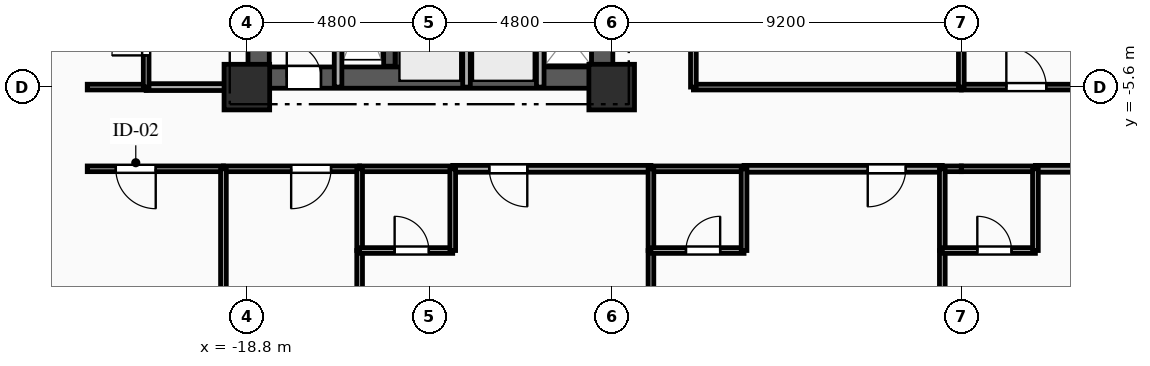
"""IFC4 building model, lengths in metres.
Left out: names, types, materials, properties, quantities, classifications, styles, units other than length and angle.
Written with IfcOpenShell. Run it as: python <this file> out.ifc"""

import sys

from ifc_helpers import new_model, si_unit, direction, frame, frame_2d, origin, origin_2d, place, context, subcontext, project, spatial, rectangle, extrude, element, fill, save


model = new_model("IFC4")
c1 = context("Model", 3, precision=1e-05, world=origin(), true_north=direction((0.0, 1.0)))
c2 = subcontext(c1, "Body", "Model", "MODEL_VIEW")
j1 = project(units=[si_unit("LENGTHUNIT", "METRE"), si_unit("PLANEANGLEUNIT", "RADIAN")], contexts=[c1])
p1 = place(None, origin())
s1 = spatial("IfcSite", under=j1, at=p1, CompositionType="ELEMENT")
p2 = place(p1, origin())
s2 = spatial("IfcBuilding", under=s1, at=p2, CompositionType="ELEMENT")
p3 = place(p2, frame((0.0, 0.0, 33.7)))
s3 = spatial("IfcBuildingStorey", under=s2, at=p3, CompositionType="ELEMENT", Elevation=33.7)
for number, where, z_axis, x_axis in (
    (1, (-18.8, -5.6, 0.0), (0.0, 0.0, 1.0), (1.0, 0.0, 0.0)),
    (2, (-9.2, -5.6, 0.0), (0.0, 0.0, 1.0), (1.0, 0.0, 0.0)),
):
    element("IfcColumn", number, at=place(p3, frame(where, z_axis=z_axis, x_axis=x_axis)), inside=s3, PredefinedType="COLUMN", context=c2, shape_type="SweptSolid", body=[
        extrude(rectangle(XDim=1.2, YDim=1.2, at=origin_2d()), origin(), (0.0, 0.0, 1.0), 3.35),
    ])
p4 = place(p3, frame((-18.8, -5.35, 0.0), z_axis=(0.0, 0.0, 1.0), x_axis=(1.0, 0.0, 0.0)))
e3 = element("IfcWall", 3, at=p4, inside=s3, PredefinedType="SHEAR", context=c2, shape_type="SweptSolid", body=[
    extrude(rectangle(XDim=9.6, YDim=0.56, at=frame_2d((4.8, 0.0))), origin(), (0.0, 0.0, 1.0), 3.035),
])
p5 = place(p4, frame((1.05, 0.0, 0.0)))
e4 = element("IfcOpeningElement", 4, at=p5, cuts=e3, PredefinedType="OPENING", context=c2, shape_type="SweptSolid", body=[
    extrude(rectangle(XDim=0.9, YDim=2.1, at=frame_2d((0.45, 1.05))), frame((0.0, 0.29, 0.0), z_axis=(0.0, -1.0, 0.0), x_axis=(1.0, 0.0, 0.0)), (0.0, 0.0, 1.0), 0.58),
])
p6 = place(p3, frame((-18.49, -5.05, 0.0), z_axis=(0.0, 0.0, 1.0), x_axis=(0.0, 1.0, 0.0)))
e5 = element("IfcWall", 5, at=p6, inside=s3, PredefinedType="SHEAR", context=c2, shape_type="SweptSolid", body=[
    extrude(rectangle(XDim=10.1, YDim=0.56, at=frame_2d((5.05, 0.0))), origin(), (0.0, 0.0, 1.0), 3.035),
])
p7 = place(p3, frame((-9.45, -5.05, 0.0), z_axis=(0.0, 0.0, 1.0), x_axis=(0.0, 1.0, 0.0)))
e6 = element("IfcWall", 6, at=p7, inside=s3, PredefinedType="SHEAR", context=c2, shape_type="SweptSolid", body=[
    extrude(rectangle(XDim=10.1, YDim=0.56, at=frame_2d((5.05, 0.0))), origin(), (0.0, 0.0, 1.0), 3.035),
])
p8 = place(p7, frame((7.15, 0.0, 0.0)))
e7 = element("IfcOpeningElement", 7, at=p8, cuts=e6, PredefinedType="OPENING", context=c2, shape_type="SweptSolid", body=[
    extrude(rectangle(XDim=0.9, YDim=2.1, at=frame_2d((0.45, 1.05))), frame((0.0, 0.29, 0.0), z_axis=(0.0, -1.0, 0.0), x_axis=(1.0, 0.0, 0.0)), (0.0, 0.0, 1.0), 0.58),
])
p9 = place(p7, frame((2.4, 0.0, 0.0)))
e8 = element("IfcOpeningElement", 8, at=p9, cuts=e6, PredefinedType="OPENING", context=c2, shape_type="SweptSolid", body=[
    extrude(rectangle(XDim=1.2, YDim=2.15, at=frame_2d((0.6, 1.075))), frame((0.0, 0.29, 0.0), z_axis=(0.0, -1.0, 0.0), x_axis=(1.0, 0.0, 0.0)), (0.0, 0.0, 1.0), 0.58),
])
p10 = place(p3, frame((-15.05, -5.05, 0.0), z_axis=(0.0, 0.0, 1.0), x_axis=(0.0, 1.0, 0.0)))
e9 = element("IfcWall", 9, at=p10, inside=s3, PredefinedType="SHEAR", context=c2, shape_type="SweptSolid", body=[
    extrude(rectangle(XDim=10.1, YDim=0.3, at=frame_2d((5.05, 0.0))), origin(), (0.0, 0.0, 1.0), 3.035),
])
p11 = place(p3, frame((-16.4, -5.6, 0.0), z_axis=(0.0, 0.0, 1.0), x_axis=(0.0, 1.0, 0.0)))
e10 = element("IfcWall", 10, at=p11, inside=s3, PredefinedType="PARTITIONING", context=c2, shape_type="SweptSolid", body=[
    extrude(rectangle(XDim=3.49, YDim=0.2, at=frame_2d((1.745, 0.0))), origin(), (0.0, 0.0, 1.0), 3.035),
])
for number, where, z_axis, x_axis in (
    (11, (-13.02, -5.6, 0.0), (0.0, 0.0, 1.0), (0.0, 1.0, 0.0)),
    (12, (-11.08, -5.6, 0.0), (0.0, 0.0, 1.0), (0.0, 1.0, 0.0)),
):
    element("IfcWall", number, at=place(p3, frame(where, z_axis=z_axis, x_axis=x_axis)), inside=s3, PredefinedType="PARTITIONING", context=c2, shape_type="SweptSolid", body=[
        extrude(rectangle(XDim=2.25, YDim=0.2, at=frame_2d((1.125, 0.0))), origin(), (0.0, 0.0, 1.0), 3.035),
    ])
p12 = place(p3, frame((-21.45, -5.6, 0.0), z_axis=(0.0, 0.0, 1.0), x_axis=(1.0, 0.0, 0.0)))
e13 = element("IfcWall", 13, at=p12, inside=s3, PredefinedType="PARTITIONING", context=c2, shape_type="SweptSolid", body=[
    extrude(rectangle(XDim=2.65, YDim=0.18, at=frame_2d((1.325, 0.0))), origin(), (0.0, 0.0, 1.0), 3.035),
])
p13 = place(p3, frame((-23.0, -5.6, 0.0), z_axis=(0.0, 0.0, 1.0), x_axis=(1.0, 0.0, 0.0)))
e14 = element("IfcWall", 14, at=p13, inside=s3, PredefinedType="PLUMBINGWALL", context=c2, shape_type="SweptSolid", body=[
    extrude(rectangle(XDim=1.55, YDim=0.15, at=frame_2d((0.775, 0.0))), origin(), (0.0, 0.0, 1.0), 3.035),
])
p14 = place(p3, frame((-19.417, -7.75, 0.0), z_axis=(0.0, 0.0, 1.0), x_axis=(-1.0, 0.0, 0.0)))
e15 = element("IfcWall", 15, at=p14, inside=s3, PredefinedType="PARTITIONING", context=c2, shape_type="SweptSolid", body=[
    extrude(rectangle(XDim=3.583, YDim=0.15, at=frame_2d((1.792, 0.0))), origin(), (0.0, 0.0, 1.0), 3.035),
])
p15 = place(p14, frame((1.782, 0.0, 0.0)))
e16 = element("IfcOpeningElement", 16, at=p15, cuts=e15, PredefinedType="OPENING", context=c2, shape_type="SweptSolid", body=[
    extrude(rectangle(XDim=1.05, YDim=2.15, at=frame_2d((0.525, 1.075))), frame((0.0, 0.085, 0.0), z_axis=(0.0, -1.0, 0.0), x_axis=(1.0, 0.0, 0.0)), (0.0, 0.0, 1.0), 0.17),
])
p16 = place(p3, frame((-15.833, -7.75, 0.0), z_axis=(0.0, 0.0, 1.0), x_axis=(-1.0, 0.0, 0.0)))
e17 = element("IfcWall", 17, at=p16, inside=s3, PredefinedType="PARTITIONING", context=c2, shape_type="SweptSolid", body=[
    extrude(rectangle(XDim=3.583, YDim=0.15, at=frame_2d((1.792, 0.0))), origin(), (0.0, 0.0, 1.0), 3.035),
])
p17 = place(p16, frame((0.752, 0.0, 0.0)))
e18 = element("IfcOpeningElement", 18, at=p17, cuts=e17, PredefinedType="OPENING", context=c2, shape_type="SweptSolid", body=[
    extrude(rectangle(XDim=1.05, YDim=2.15, at=frame_2d((0.525, 1.075))), frame((0.0, 0.085, 0.0), z_axis=(0.0, -1.0, 0.0), x_axis=(1.0, 0.0, 0.0)), (0.0, 0.0, 1.0), 0.17),
])
p18 = place(p3, frame((-8.167, -7.75, 0.0), z_axis=(0.0, 0.0, 1.0), x_axis=(-1.0, 0.0, 0.0)))
e19 = element("IfcWall", 19, at=p18, inside=s3, PredefinedType="PARTITIONING", context=c2, shape_type="SweptSolid", body=[
    extrude(rectangle(XDim=5.216, YDim=0.18, at=frame_2d((2.608, 0.0))), origin(), (0.0, 0.0, 1.0), 3.035),
])
p19 = place(p18, frame((3.254, 0.0, 0.0)))
e20 = element("IfcOpeningElement", 20, at=p19, cuts=e19, PredefinedType="OPENING", context=c2, shape_type="SweptSolid", body=[
    extrude(rectangle(XDim=1.0, YDim=2.15, at=frame_2d((0.5, 1.075))), frame((0.0, 0.1, 0.0), z_axis=(0.0, -1.0, 0.0), x_axis=(1.0, 0.0, 0.0)), (0.0, 0.0, 1.0), 0.2),
])
p20 = place(p3, frame((-13.383, -7.75, 0.0), z_axis=(0.0, 0.0, 1.0), x_axis=(-1.0, 0.0, 0.0)))
e21 = element("IfcWall", 21, at=p20, inside=s3, PredefinedType="PLUMBINGWALL", context=c2, shape_type="SweptSolid", body=[
    extrude(rectangle(XDim=2.45, YDim=0.15, at=frame_2d((1.225, 0.0))), origin(), (0.0, 0.0, 1.0), 3.035),
])
p21 = place(p3, frame((-0.5, -7.75, 0.0), z_axis=(0.0, 0.0, 1.0), x_axis=(-1.0, 0.0, 0.0)))
e22 = element("IfcWall", 22, at=p21, inside=s3, PredefinedType="PARTITIONING", context=c2, shape_type="SweptSolid", body=[
    extrude(rectangle(XDim=5.217, YDim=0.18, at=frame_2d((2.608, 0.0))), origin(), (0.0, 0.0, 1.0), 3.035),
])
p22 = place(p21, frame((0.962, 0.0, 0.0)))
e23 = element("IfcOpeningElement", 23, at=p22, cuts=e22, PredefinedType="OPENING", context=c2, shape_type="SweptSolid", body=[
    extrude(rectangle(XDim=1.0, YDim=2.15, at=frame_2d((0.5, 1.075))), frame((0.0, 0.1, 0.0), z_axis=(0.0, -1.0, 0.0), x_axis=(1.0, 0.0, 0.0)), (0.0, 0.0, 1.0), 0.2),
])
p23 = place(p3, frame((-5.717, -7.75, 0.0), z_axis=(0.0, 0.0, 1.0), x_axis=(-1.0, 0.0, 0.0)))
e24 = element("IfcWall", 24, at=p23, inside=s3, PredefinedType="PLUMBINGWALL", context=c2, shape_type="SweptSolid", body=[
    extrude(rectangle(XDim=2.45, YDim=0.15, at=frame_2d((1.225, 0.0))), origin(), (0.0, 0.0, 1.0), 3.035),
])
p24 = place(p3, frame((0.0, -7.75, 0.0), z_axis=(0.0, 0.0, 1.0), x_axis=(-1.0, 0.0, 0.0)))
e25 = element("IfcWall", 25, at=p24, inside=s3, PredefinedType="PLUMBINGWALL", context=c2, shape_type="SweptSolid", body=[
    extrude(rectangle(XDim=0.5, YDim=0.15, at=frame_2d((0.25, 0.0))), origin(), (0.0, 0.0, 1.0), 3.035),
])
p25 = place(p3, frame((-7.05, -5.6, 0.0), z_axis=(0.0, 0.0, 1.0), x_axis=(1.0, 0.0, 0.0)))
e26 = element("IfcWall", 26, at=p25, inside=s3, PredefinedType="PARTITIONING", context=c2, shape_type="SweptSolid", body=[
    extrude(rectangle(XDim=7.05, YDim=0.15, at=frame_2d((3.525, 0.0))), origin(), (0.0, 0.0, 1.0), 2.52),
])
p26 = place(p3, frame((7.167, -7.75, 0.0), z_axis=(0.0, 0.0, 1.0), x_axis=(-1.0, 0.0, 0.0)))
e27 = element("IfcWall", 27, at=p26, inside=s3, PredefinedType="PARTITIONING", context=c2, shape_type="SweptSolid", body=[
    extrude(rectangle(XDim=5.217, YDim=0.18, at=frame_2d((2.608, 0.0))), origin(), (0.0, 0.0, 1.0), 3.035),
])
p27 = place(p26, frame((3.255, 0.0, 0.0)))
e28 = element("IfcOpeningElement", 28, at=p27, cuts=e27, PredefinedType="OPENING", context=c2, shape_type="SweptSolid", body=[
    extrude(rectangle(XDim=1.0, YDim=2.15, at=frame_2d((0.5, 1.075))), frame((0.0, 0.1, 0.0), z_axis=(0.0, -1.0, 0.0), x_axis=(1.0, 0.0, 0.0)), (0.0, 0.0, 1.0), 0.2),
])
p28 = place(p3, frame((1.95, -7.75, 0.0), z_axis=(0.0, 0.0, 1.0), x_axis=(-1.0, 0.0, 0.0)))
e29 = element("IfcWall", 29, at=p28, inside=s3, PredefinedType="PLUMBINGWALL", context=c2, shape_type="SweptSolid", body=[
    extrude(rectangle(XDim=1.95, YDim=0.15, at=frame_2d((0.975, 0.0))), origin(), (0.0, 0.0, 1.0), 3.035),
])
p29 = place(p3, frame((0.0, -5.6, 0.0), z_axis=(0.0, 0.0, 1.0), x_axis=(1.0, 0.0, 0.0)))
e30 = element("IfcWall", 30, at=p29, inside=s3, PredefinedType="PARTITIONING", context=c2, shape_type="SweptSolid", body=[
    extrude(rectangle(XDim=7.05, YDim=0.15, at=frame_2d((3.525, 0.0))), origin(), (0.0, 0.0, 1.0), 2.52),
])
p30 = place(p29, frame((1.185, 0.0, 0.0)))
e31 = element("IfcOpeningElement", 31, at=p30, cuts=e30, PredefinedType="OPENING", context=c2, shape_type="SweptSolid", body=[
    extrude(rectangle(XDim=1.05, YDim=2.15, at=frame_2d((0.525, 1.075))), frame((0.0, 0.085, 0.0), z_axis=(0.0, -1.0, 0.0), x_axis=(1.0, 0.0, 0.0)), (0.0, 0.0, 1.0), 0.17),
])
p31 = place(p3, frame((-7.05, 8.5, 0.0), z_axis=(0.0, 0.0, 1.0), x_axis=(0.0, -1.0, 0.0)))
e32 = element("IfcWall", 32, at=p31, inside=s3, PredefinedType="PARTITIONING", context=c2, shape_type="SweptSolid", body=[
    extrude(rectangle(XDim=14.1, YDim=0.15, at=frame_2d((7.05, 0.0))), origin(), (0.0, 0.0, 1.0), 3.035),
])
p32 = place(p31, frame((8.011, 0.0, 0.0)))
e33 = element("IfcOpeningElement", 33, at=p32, cuts=e32, PredefinedType="OPENING", context=c2, shape_type="SweptSolid", body=[
    extrude(rectangle(XDim=1.05, YDim=2.15, at=frame_2d((0.525, 1.075))), frame((0.0, 0.085, 0.0), z_axis=(0.0, -1.0, 0.0), x_axis=(1.0, 0.0, 0.0)), (0.0, 0.0, 1.0), 0.17),
])
p33 = place(p3, frame((-21.45, -5.6, 0.0), z_axis=(0.0, 0.0, 1.0), x_axis=(0.0, 1.0, 0.0)))
e34 = element("IfcWall", 34, at=p33, inside=s3, PredefinedType="PLUMBINGWALL", context=c2, shape_type="SweptSolid", body=[
    extrude(rectangle(XDim=2.35, YDim=0.15, at=frame_2d((1.175, 0.0))), origin(), (0.0, 0.0, 1.0), 3.035),
])
p34 = place(p33, frame((0.834, 0.0, 0.0)))
e35 = element("IfcOpeningElement", 35, at=p34, cuts=e34, PredefinedType="OPENING", context=c2, shape_type="SweptSolid", body=[
    extrude(rectangle(XDim=0.9, YDim=2.1, at=frame_2d((0.45, 1.05))), frame((0.0, 0.085, 0.0), z_axis=(0.0, -1.0, 0.0), x_axis=(1.0, 0.0, 0.0)), (0.0, 0.0, 1.0), 0.17),
])
p35 = place(p3, frame((-19.417, -7.75, 0.0), z_axis=(0.0, 0.0, 1.0), x_axis=(0.0, -1.0, 0.0)))
e36 = element("IfcWall", 36, at=p35, inside=s3, PredefinedType="PARTITIONING", context=c2, shape_type="SweptSolid", body=[
    extrude(rectangle(XDim=11.65, YDim=0.15, at=frame_2d((5.825, 0.0))), origin(), (0.0, 0.0, 1.0), 3.035),
])
p36 = place(p3, frame((-15.833, -9.9, 0.0), z_axis=(0.0, 0.0, 1.0), x_axis=(0.0, -1.0, 0.0)))
e37 = element("IfcWall", 37, at=p36, inside=s3, PredefinedType="PARTITIONING", context=c2, shape_type="SweptSolid", body=[
    extrude(rectangle(XDim=9.5, YDim=0.15, at=frame_2d((4.75, 0.0))), origin(), (0.0, 0.0, 1.0), 3.035),
])
p37 = place(p3, frame((-15.833, -7.75, 0.0), z_axis=(0.0, 0.0, 1.0), x_axis=(0.0, -1.0, 0.0)))
e38 = element("IfcWall", 38, at=p37, inside=s3, PredefinedType="PLUMBINGWALL", context=c2, shape_type="SweptSolid", body=[
    extrude(rectangle(XDim=2.15, YDim=0.15, at=frame_2d((1.075, 0.0))), origin(), (0.0, 0.0, 1.0), 3.035),
])
p38 = place(p3, frame((-15.833, -9.9, 0.0), z_axis=(0.0, 0.0, 1.0), x_axis=(1.0, 0.0, 0.0)))
e39 = element("IfcWall", 39, at=p38, inside=s3, PredefinedType="PLUMBINGWALL", context=c2, shape_type="SweptSolid", body=[
    extrude(rectangle(XDim=2.45, YDim=0.15, at=frame_2d((1.225, 0.0))), origin(), (0.0, 0.0, 1.0), 3.035),
])
p39 = place(p38, frame((0.921, 0.0, 0.0)))
e40 = element("IfcOpeningElement", 40, at=p39, cuts=e39, PredefinedType="OPENING", context=c2, shape_type="SweptSolid", body=[
    extrude(rectangle(XDim=0.9, YDim=2.1, at=frame_2d((0.45, 1.05))), frame((0.0, 0.085, 0.0), z_axis=(0.0, -1.0, 0.0), x_axis=(1.0, 0.0, 0.0)), (0.0, 0.0, 1.0), 0.17),
])
p40 = place(p3, frame((-13.383, -9.9, 0.0), z_axis=(0.0, 0.0, 1.0), x_axis=(0.0, 1.0, 0.0)))
e41 = element("IfcWall", 41, at=p40, inside=s3, PredefinedType="PLUMBINGWALL", context=c2, shape_type="SweptSolid", body=[
    extrude(rectangle(XDim=2.15, YDim=0.15, at=frame_2d((1.075, 0.0))), origin(), (0.0, 0.0, 1.0), 3.035),
])
p41 = place(p3, frame((-8.167, -9.9, 0.0), z_axis=(0.0, 0.0, 1.0), x_axis=(0.0, -1.0, 0.0)))
e42 = element("IfcWall", 42, at=p41, inside=s3, PredefinedType="PARTITIONING", context=c2, shape_type="SweptSolid", body=[
    extrude(rectangle(XDim=9.5, YDim=0.15, at=frame_2d((4.75, 0.0))), origin(), (0.0, 0.0, 1.0), 3.035),
])
p42 = place(p3, frame((-8.167, -7.75, 0.0), z_axis=(0.0, 0.0, 1.0), x_axis=(0.0, -1.0, 0.0)))
e43 = element("IfcWall", 43, at=p42, inside=s3, PredefinedType="PLUMBINGWALL", context=c2, shape_type="SweptSolid", body=[
    extrude(rectangle(XDim=2.15, YDim=0.15, at=frame_2d((1.075, 0.0))), origin(), (0.0, 0.0, 1.0), 3.035),
])
p43 = place(p3, frame((-8.167, -9.9, 0.0), z_axis=(0.0, 0.0, 1.0), x_axis=(1.0, 0.0, 0.0)))
e44 = element("IfcWall", 44, at=p43, inside=s3, PredefinedType="PLUMBINGWALL", context=c2, shape_type="SweptSolid", body=[
    extrude(rectangle(XDim=2.45, YDim=0.15, at=frame_2d((1.225, 0.0))), origin(), (0.0, 0.0, 1.0), 3.035),
])
p44 = place(p43, frame((0.921, 0.0, 0.0)))
e45 = element("IfcOpeningElement", 45, at=p44, cuts=e44, PredefinedType="OPENING", context=c2, shape_type="SweptSolid", body=[
    extrude(rectangle(XDim=0.9, YDim=2.1, at=frame_2d((0.45, 1.05))), frame((0.0, 0.085, 0.0), z_axis=(0.0, -1.0, 0.0), x_axis=(1.0, 0.0, 0.0)), (0.0, 0.0, 1.0), 0.17),
])
p45 = place(p3, frame((-5.717, -9.9, 0.0), z_axis=(0.0, 0.0, 1.0), x_axis=(0.0, 1.0, 0.0)))
e46 = element("IfcWall", 46, at=p45, inside=s3, PredefinedType="PLUMBINGWALL", context=c2, shape_type="SweptSolid", body=[
    extrude(rectangle(XDim=2.15, YDim=0.15, at=frame_2d((1.075, 0.0))), origin(), (0.0, 0.0, 1.0), 3.035),
])
p46 = place(p3, frame((-0.5, -9.9, 0.0), z_axis=(0.0, 0.0, 1.0), x_axis=(0.0, -1.0, 0.0)))
e47 = element("IfcWall", 47, at=p46, inside=s3, PredefinedType="PARTITIONING", context=c2, shape_type="SweptSolid", body=[
    extrude(rectangle(XDim=9.5, YDim=0.15, at=frame_2d((4.75, 0.0))), origin(), (0.0, 0.0, 1.0), 3.035),
])
p47 = place(p3, frame((-0.5, -7.75, 0.0), z_axis=(0.0, 0.0, 1.0), x_axis=(0.0, -1.0, 0.0)))
e48 = element("IfcWall", 48, at=p47, inside=s3, PredefinedType="PLUMBINGWALL", context=c2, shape_type="SweptSolid", body=[
    extrude(rectangle(XDim=2.15, YDim=0.15, at=frame_2d((1.075, 0.0))), origin(), (0.0, 0.0, 1.0), 3.035),
])
p48 = place(p3, frame((-0.5, -9.9, 0.0), z_axis=(0.0, 0.0, 1.0), x_axis=(1.0, 0.0, 0.0)))
e49 = element("IfcWall", 49, at=p48, inside=s3, PredefinedType="PLUMBINGWALL", context=c2, shape_type="SweptSolid", body=[
    extrude(rectangle(XDim=2.45, YDim=0.15, at=frame_2d((1.225, 0.0))), origin(), (0.0, 0.0, 1.0), 3.035),
])
p49 = place(p48, frame((0.921, 0.0, 0.0)))
e50 = element("IfcOpeningElement", 50, at=p49, cuts=e49, PredefinedType="OPENING", context=c2, shape_type="SweptSolid", body=[
    extrude(rectangle(XDim=0.9, YDim=2.1, at=frame_2d((0.45, 1.05))), frame((0.0, 0.085, 0.0), z_axis=(0.0, -1.0, 0.0), x_axis=(1.0, 0.0, 0.0)), (0.0, 0.0, 1.0), 0.17),
])
p50 = place(p3, frame((1.95, -9.9, 0.0), z_axis=(0.0, 0.0, 1.0), x_axis=(0.0, 1.0, 0.0)))
e51 = element("IfcWall", 51, at=p50, inside=s3, PredefinedType="PLUMBINGWALL", context=c2, shape_type="SweptSolid", body=[
    extrude(rectangle(XDim=2.15, YDim=0.15, at=frame_2d((1.075, 0.0))), origin(), (0.0, 0.0, 1.0), 3.035),
])
p51 = place(p3, frame((0.0, 1.45, 0.0), z_axis=(0.0, 0.0, 1.0), x_axis=(0.0, -1.0, 0.0)))
e52 = element("IfcWall", 52, at=p51, inside=s3, PredefinedType="PARTITIONING", context=c2, shape_type="SweptSolid", body=[
    extrude(rectangle(XDim=7.05, YDim=0.15, at=frame_2d((3.525, 0.0))), origin(), (0.0, 0.0, 1.0), 3.035),
])
p52 = place(p5, origin())
e53 = element("IfcDoor", 53, at=p52, inside=s3, OperationType="SINGLE_SWING_LEFT", PredefinedType="DOOR", context=c2, shape_type="SweptSolid", body=[
    extrude(rectangle(XDim=0.9, YDim=2.1, at=frame_2d((0.45, 1.05))), frame((0.0, 0.025, 0.0), z_axis=(0.0, -1.0, 0.0), x_axis=(1.0, 0.0, 0.0)), (0.0, 0.0, 1.0), 0.05),
])
fill(e4, e53)
p53 = place(p15, origin())
e54 = element("IfcDoor", 54, at=p53, inside=s3, OperationType="SINGLE_SWING_LEFT", PredefinedType="DOOR", context=c2, shape_type="SweptSolid", body=[
    extrude(rectangle(XDim=1.05, YDim=2.15, at=frame_2d((0.525, 1.075))), frame((0.0, 0.025, 0.0), z_axis=(0.0, -1.0, 0.0), x_axis=(1.0, 0.0, 0.0)), (0.0, 0.0, 1.0), 0.05),
])
fill(e16, e54)
p54 = place(p17, origin())
e55 = element("IfcDoor", 55, at=p54, inside=s3, OperationType="SINGLE_SWING_RIGHT", PredefinedType="DOOR", context=c2, shape_type="SweptSolid", body=[
    extrude(rectangle(XDim=1.05, YDim=2.15, at=frame_2d((0.525, 1.075))), frame((0.0, 0.025, 0.0), z_axis=(0.0, -1.0, 0.0), x_axis=(1.0, 0.0, 0.0)), (0.0, 0.0, 1.0), 0.05),
])
fill(e18, e55)
p55 = place(p19, origin())
e56 = element("IfcDoor", 56, at=p55, inside=s3, OperationType="SINGLE_SWING_LEFT", PredefinedType="DOOR", context=c2, shape_type="SweptSolid", body=[
    extrude(rectangle(XDim=1.0, YDim=2.15, at=frame_2d((0.5, 1.075))), frame((0.0, 0.025, 0.0), z_axis=(0.0, -1.0, 0.0), x_axis=(1.0, 0.0, 0.0)), (0.0, 0.0, 1.0), 0.05),
])
fill(e20, e56)
p56 = place(p22, origin())
e57 = element("IfcDoor", 57, at=p56, inside=s3, OperationType="SINGLE_SWING_RIGHT", PredefinedType="DOOR", context=c2, shape_type="SweptSolid", body=[
    extrude(rectangle(XDim=1.0, YDim=2.15, at=frame_2d((0.5, 1.075))), frame((0.0, 0.025, 0.0), z_axis=(0.0, -1.0, 0.0), x_axis=(1.0, 0.0, 0.0)), (0.0, 0.0, 1.0), 0.05),
])
fill(e23, e57)
p57 = place(p30, origin())
e58 = element("IfcDoor", 58, at=p57, inside=s3, OperationType="SINGLE_SWING_LEFT", PredefinedType="DOOR", context=c2, shape_type="SweptSolid", body=[
    extrude(rectangle(XDim=1.05, YDim=2.15, at=frame_2d((0.525, 1.075))), frame((0.0, 0.025, 0.0), z_axis=(0.0, -1.0, 0.0), x_axis=(1.0, 0.0, 0.0)), (0.0, 0.0, 1.0), 0.05),
])
fill(e31, e58)
p58 = place(p34, origin())
e59 = element("IfcDoor", 59, at=p58, inside=s3, OperationType="SINGLE_SWING_LEFT", PredefinedType="DOOR", context=c2, shape_type="SweptSolid", body=[
    extrude(rectangle(XDim=0.9, YDim=2.1, at=frame_2d((0.45, 1.05))), frame((0.0, 0.025, 0.0), z_axis=(0.0, -1.0, 0.0), x_axis=(1.0, 0.0, 0.0)), (0.0, 0.0, 1.0), 0.05),
])
fill(e35, e59)
p59 = place(p39, origin())
e60 = element("IfcDoor", 60, at=p59, inside=s3, OperationType="SINGLE_SWING_LEFT", PredefinedType="DOOR", context=c2, shape_type="SweptSolid", body=[
    extrude(rectangle(XDim=0.9, YDim=2.1, at=frame_2d((0.45, 1.05))), frame((0.0, 0.025, 0.0), z_axis=(0.0, -1.0, 0.0), x_axis=(1.0, 0.0, 0.0)), (0.0, 0.0, 1.0), 0.05),
])
fill(e40, e60)
p60 = place(p44, origin())
e61 = element("IfcDoor", 61, at=p60, inside=s3, OperationType="SINGLE_SWING_RIGHT", PredefinedType="DOOR", context=c2, shape_type="SweptSolid", body=[
    extrude(rectangle(XDim=0.9, YDim=2.1, at=frame_2d((0.45, 1.05))), frame((0.0, 0.025, 0.0), z_axis=(0.0, -1.0, 0.0), x_axis=(1.0, 0.0, 0.0)), (0.0, 0.0, 1.0), 0.05),
])
fill(e45, e61)
p61 = place(p49, origin())
e62 = element("IfcDoor", 62, at=p61, inside=s3, OperationType="SINGLE_SWING_LEFT", PredefinedType="DOOR", context=c2, shape_type="SweptSolid", body=[
    extrude(rectangle(XDim=0.9, YDim=2.1, at=frame_2d((0.45, 1.05))), frame((0.0, 0.025, 0.0), z_axis=(0.0, -1.0, 0.0), x_axis=(1.0, 0.0, 0.0)), (0.0, 0.0, 1.0), 0.05),
])
fill(e50, e62)
save(model, sys.argv[1])
